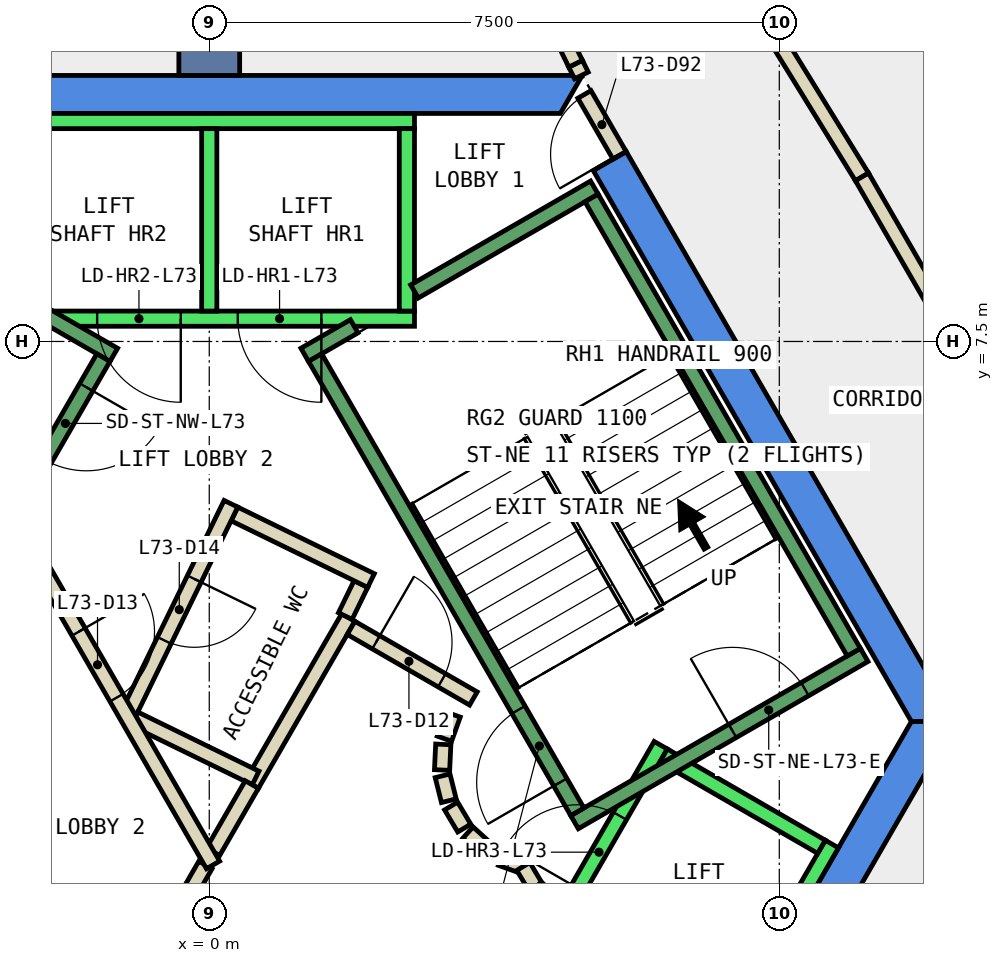
"""IFC4 building model, lengths in metres.
Left out: names, types, materials, properties, quantities, classifications, styles, units other than length and angle.
Written with IfcOpenShell. Run it as: python <this file> out.ifc"""

import sys

from ifc_helpers import new_model, si_unit, direction, frame, frame_2d, origin, place, context, subcontext, project, spatial, polyline, rectangle, outline, extrude, element, fill, save


model = new_model("IFC4")
c1 = context("Model", 3, precision=1e-05, world=origin(), true_north=direction((0.0, 1.0)))
c2 = subcontext(c1, "Body", "Model", "MODEL_VIEW")
j1 = project(units=[si_unit("LENGTHUNIT", "METRE"), si_unit("PLANEANGLEUNIT", "RADIAN")], contexts=[c1])
p1 = place(None, origin())
s1 = spatial("IfcSite", under=j1, at=p1, CompositionType="ELEMENT")
p2 = place(p1, origin())
s2 = spatial("IfcBuilding", under=s1, at=p2, CompositionType="ELEMENT")
p3 = place(p2, frame((0.0, 0.0, 311.6)))
s3 = spatial("IfcBuildingStorey", under=s2, at=p3, CompositionType="ELEMENT", Elevation=311.6)
p4 = place(p3, frame((0.0, 0.0, -0.34)))
e1 = element("IfcWall", 1, at=p4, inside=s3, PredefinedType="SHEAR", context=c2, shape_type="SweptSolid", body=[
    extrude(outline(polyline([(5.486, 9.998), (5.053, 9.748), (9.238, 2.5), (9.815, 2.5), (5.486, 9.998)])), origin(), (0.0, 0.0, 1.0), 3.6),
])
p5 = place(p3, frame((0.0, 0.0, -0.34)))
e2 = element("IfcWall", 2, at=p5, inside=s3, PredefinedType="SHEAR", context=c2, shape_type="SweptSolid", body=[
    extrude(outline(polyline([(4.907, 11.0), (-4.907, 11.0), (-4.619, 10.5), (4.619, 10.5), (4.907, 11.0)])), origin(), (0.0, 0.0, 1.0), 3.6),
])
p6 = place(p3, frame((0.0, 0.0, -0.34)))
e3 = element("IfcWall", 3, at=p6, inside=s3, PredefinedType="SHEAR", context=c2, shape_type="SweptSolid", body=[
    extrude(outline(polyline([(4.907, -6.0), (9.815, 2.5), (9.238, 2.5), (4.619, -5.5), (4.907, -6.0)])), origin(), (0.0, 0.0, 1.0), 3.6),
])
p7 = place(p3, frame((0.0, 11.0, -0.34), z_axis=(0.0, 0.0, 1.0), x_axis=(0.0, 1.0, 0.0)))
e4 = element("IfcWall", 4, at=p7, inside=s3, PredefinedType="SHEAR", context=c2, shape_type="SweptSolid", body=[
    extrude(rectangle(XDim=9.0, YDim=0.8, at=frame_2d((4.5, 0.0))), origin(), (0.0, 0.0, 1.0), 3.6),
])
p8 = place(p3, frame((0.56, 1.671, 0.0), z_axis=(0.0, 0.0, 1.0), x_axis=(0.500008334558, 0.866020591771, 0.0)))
e5 = element("IfcWall", 5, at=p8, inside=s3, PredefinedType="PARTITIONING", context=c2, shape_type="SweptSolid", body=[
    extrude(rectangle(XDim=2.538, YDim=0.2, at=frame_2d((1.269, 0.0))), origin(), (0.0, 0.0, 1.0), 3.26),
])
p9 = place(p3, frame((1.79, 3.888, 0.0), z_axis=(0.0, 0.0, 1.0), x_axis=(0.437807406823, 0.899068781869, 0.0)))
e6 = element("IfcWall", 6, at=p9, inside=s3, PredefinedType="PARTITIONING", context=c2, shape_type="SweptSolid", body=[
    extrude(rectangle(XDim=0.469, YDim=0.2, at=frame_2d((0.234, 0.0))), origin(), (0.0, 0.0, 1.0), 3.26),
])
p10 = place(p3, frame((2.128, 4.355, 0.0), z_axis=(0.0, 0.0, 1.0), x_axis=(-0.898876404494, 0.438202247191, 0.0)))
e7 = element("IfcWall", 7, at=p10, inside=s3, PredefinedType="PARTITIONING", context=c2, shape_type="SweptSolid", body=[
    extrude(rectangle(XDim=1.999, YDim=0.2, at=frame_2d((1.0, 0.0))), origin(), (0.0, 0.0, 1.0), 3.26),
])
p11 = place(p3, frame((0.285, 5.365, 0.0), z_axis=(0.0, 0.0, 1.0), x_axis=(-0.43840190643, -0.898779043168, 0.0)))
e8 = element("IfcWall", 8, at=p11, inside=s3, PredefinedType="PARTITIONING", context=c2, shape_type="SweptSolid", body=[
    extrude(rectangle(XDim=3.1, YDim=0.2, at=frame_2d((1.55, 0.0))), origin(), (0.0, 0.0, 1.0), 3.26),
])
p12 = place(p11, frame((1.1, 0.0, 0.0)))
e9 = element("IfcOpeningElement", 9, at=p12, cuts=e8, PredefinedType="OPENING", context=c2, shape_type="SweptSolid", body=[
    extrude(rectangle(XDim=0.9, YDim=2.1, at=frame_2d((0.45, 1.05))), frame((0.0, 0.11, 0.0), z_axis=(0.0, -1.0, 0.0), x_axis=(1.0, 0.0, 0.0)), (0.0, 0.0, 1.0), 0.22),
])
p13 = place(p3, frame((-0.984, 2.535, 0.0), z_axis=(0.0, 0.0, 1.0), x_axis=(0.898707583217, -0.438548378025, 0.0)))
e10 = element("IfcWall", 10, at=p13, inside=s3, PredefinedType="PARTITIONING", context=c2, shape_type="SweptSolid", body=[
    extrude(rectangle(XDim=1.774, YDim=0.2, at=frame_2d((0.887, 0.0))), origin(), (0.0, 0.0, 1.0), 3.26),
])
p14 = place(p3, frame((4.896, 11.0, 0.0), z_axis=(0.0, 0.0, 1.0), x_axis=(-0.44208884847, 0.896971264901, 0.0)))
e11 = element("IfcWall", 11, at=p14, inside=s3, PredefinedType="PARTITIONING", context=c2, shape_type="SweptSolid", body=[
    extrude(rectangle(XDim=0.172, YDim=0.2, at=frame_2d((0.086, 0.0))), origin(), (0.0, 0.0, 1.0), 2.4),
])
p15 = place(p3, frame((4.454, 16.364, 0.0), z_axis=(0.0, 0.0, 1.0), x_axis=(0.525142215688, -0.851014484778, 0.0)))
e12 = element("IfcWall", 12, at=p15, inside=s3, PredefinedType="PARTITIONING", context=c2, shape_type="SweptSolid", body=[
    extrude(rectangle(XDim=7.872, YDim=0.2, at=frame_2d((3.936, 0.0))), origin(), (0.0, 0.0, 1.0), 3.26),
])
p16 = place(p3, frame((8.588, 9.665, 0.0), z_axis=(0.0, 0.0, 1.0), x_axis=(0.499946799636, -0.86605611685, 0.0)))
e13 = element("IfcWall", 13, at=p16, inside=s3, PredefinedType="PARTITIONING", context=c2, shape_type="SweptSolid", body=[
    extrude(rectangle(XDim=8.227, YDim=0.2, at=frame_2d((4.114, 0.0))), origin(), (0.0, 0.0, 1.0), 3.26),
])
p17 = place(p16, frame((3.613, 0.0, 0.0)))
e14 = element("IfcOpeningElement", 14, at=p17, cuts=e13, PredefinedType="OPENING", context=c2, shape_type="SweptSolid", body=[
    extrude(rectangle(XDim=1.0, YDim=2.1, at=frame_2d((0.5, 1.05))), frame((0.0, 0.11, 0.0), z_axis=(0.0, -1.0, 0.0), x_axis=(1.0, 0.0, 0.0)), (0.0, 0.0, 1.0), 0.22),
])
p18 = place(p3, frame((-0.982, -1.0, 0.0), z_axis=(0.0, 0.0, 1.0), x_axis=(0.50024047865, 0.865886518847, 0.0)))
e15 = element("IfcWall", 15, at=p18, inside=s3, PredefinedType="PARTITIONING", context=c2, shape_type="SweptSolid", body=[
    extrude(rectangle(XDim=1.863, YDim=0.2, at=frame_2d((0.931, 0.0))), origin(), (0.0, 0.0, 1.0), 3.26),
])
p19 = place(p3, frame((0.05, 0.787, 0.0), z_axis=(0.0, 0.0, 1.0), x_axis=(0.499819111317, 0.866129814729, 0.0)))
e16 = element("IfcWall", 16, at=p19, inside=s3, PredefinedType="PARTITIONING", context=c2, shape_type="SweptSolid", body=[
    extrude(rectangle(XDim=1.021, YDim=0.2, at=frame_2d((0.51, 0.0))), origin(), (0.0, 0.0, 1.0), 3.26),
])
p20 = place(p3, frame((1.866, 3.732, 0.0), z_axis=(0.0, 0.0, 1.0), x_axis=(0.866043361281, -0.499968895414, 0.0)))
e17 = element("IfcWall", 17, at=p20, inside=s3, PredefinedType="PARTITIONING", context=c2, shape_type="SweptSolid", body=[
    extrude(rectangle(XDim=1.858, YDim=0.2, at=frame_2d((0.929, 0.0))), origin(), (0.0, 0.0, 1.0), 3.26),
])
p21 = place(p20, frame((0.379, 0.0, 0.0)))
e18 = element("IfcOpeningElement", 18, at=p21, cuts=e17, PredefinedType="OPENING", context=c2, shape_type="SweptSolid", body=[
    extrude(rectangle(XDim=1.0, YDim=2.1, at=frame_2d((0.5, 1.05))), frame((0.0, 0.11, 0.0), z_axis=(0.0, -1.0, 0.0), x_axis=(1.0, 0.0, 0.0)), (0.0, 0.0, 1.0), 0.22),
])
p22 = place(p3, frame((3.208, 2.592, 0.0), z_axis=(0.0, 0.0, 1.0), x_axis=(-0.337388820924, -0.941365382578, 0.0)))
e19 = element("IfcWall", 19, at=p22, inside=s3, PredefinedType="PARTITIONING", context=c2, shape_type="SweptSolid", body=[
    extrude(rectangle(XDim=0.338, YDim=0.2, at=frame_2d((0.169, 0.0))), origin(), (0.0, 0.0, 1.0), 3.26),
])
p23 = place(p3, frame((3.079, 2.199, 0.0), z_axis=(0.0, 0.0, 1.0), x_axis=(-0.047771483479, -0.998858290933, 0.0)))
e20 = element("IfcWall", 20, at=p23, inside=s3, PredefinedType="PARTITIONING", context=c2, shape_type="SweptSolid", body=[
    extrude(rectangle(XDim=0.337, YDim=0.2, at=frame_2d((0.169, 0.0))), origin(), (0.0, 0.0, 1.0), 3.26),
])
p24 = place(p3, frame((3.07, 1.786, 0.0), z_axis=(0.0, 0.0, 1.0), x_axis=(0.242705583207, -0.970099994784, 0.0)))
e21 = element("IfcWall", 21, at=p24, inside=s3, PredefinedType="PARTITIONING", context=c2, shape_type="SweptSolid", body=[
    extrude(rectangle(XDim=0.338, YDim=0.2, at=frame_2d((0.169, 0.0))), origin(), (0.0, 0.0, 1.0), 3.26),
])
for number, where, z_axis, x_axis in (
    (22, (3.182, 1.388, 0.0), (0.0, 0.0, 1.0), (0.512, -0.859, 0.0)),
    (23, (3.404, 1.039, 0.0), (0.0, 0.0, 1.0), (0.74, -0.672, 0.0)),
):
    element("IfcWall", number, at=place(p3, frame(where, z_axis=z_axis, x_axis=x_axis)), inside=s3, PredefinedType="PARTITIONING", context=c2, shape_type="SweptSolid", body=[
        extrude(rectangle(XDim=0.338, YDim=0.2, at=frame_2d((0.169, 0.0))), origin(), (0.0, 0.0, 1.0), 3.26),
    ])
p25 = place(p3, frame((3.838, 0.702, 0.0), z_axis=(0.0, 0.0, 1.0), x_axis=(0.941035081519, -0.338308993895, 0.0)))
e24 = element("IfcWall", 24, at=p25, inside=s3, PredefinedType="PARTITIONING", context=c2, shape_type="SweptSolid", body=[
    extrude(rectangle(XDim=0.337, YDim=0.2, at=frame_2d((0.168, 0.0))), origin(), (0.0, 0.0, 1.0), 3.26),
])
p26 = place(p3, frame((4.132, 0.593, 0.0), z_axis=(0.0, 0.0, 1.0), x_axis=(0.513561617048, -0.858052717201, 0.0)))
e25 = element("IfcWall", 25, at=p26, inside=s3, PredefinedType="PARTITIONING", context=c2, shape_type="SweptSolid", body=[
    extrude(rectangle(XDim=0.308, YDim=0.2, at=frame_2d((0.154, 0.0))), origin(), (0.0, 0.0, 1.0), 3.26),
])
p27 = place(p3, frame((4.301, 0.315, 0.0), z_axis=(0.0, 0.0, 1.0), x_axis=(0.741798017506, -0.670623367639, 0.0)))
e26 = element("IfcWall", 26, at=p27, inside=s3, PredefinedType="PARTITIONING", context=c2, shape_type="SweptSolid", body=[
    extrude(rectangle(XDim=0.309, YDim=0.2, at=frame_2d((0.154, 0.0))), origin(), (0.0, 0.0, 1.0), 3.26),
])
p28 = place(p3, frame((-2.54, 5.1, 0.0), z_axis=(0.0, 0.0, 1.0), x_axis=(0.499925051871, -0.866068670783, 0.0)))
e27 = element("IfcWall", 27, at=p28, inside=s3, PredefinedType="PARTITIONING", context=c2, shape_type="SweptSolid", body=[
    extrude(rectangle(XDim=5.181, YDim=0.2, at=frame_2d((2.59, 0.0))), origin(), (0.0, 0.0, 1.0), 3.26),
])
p29 = place(p28, frame((1.64, 0.0, 0.0)))
e28 = element("IfcOpeningElement", 28, at=p29, cuts=e27, PredefinedType="OPENING", context=c2, shape_type="SweptSolid", body=[
    extrude(rectangle(XDim=1.0, YDim=2.1, at=frame_2d((0.5, 1.05))), frame((0.0, 0.11, 0.0), z_axis=(0.0, -1.0, 0.0), x_axis=(1.0, 0.0, 0.0)), (0.0, 0.0, 1.0), 0.22),
])
p30 = place(p3, frame((5.399, 9.948, 0.0), z_axis=(0.0, 0.0, 1.0), x_axis=(-0.499882215713, 0.866093395895, 0.0)))
e29 = element("IfcWall", 29, at=p30, inside=s3, PredefinedType="PARTITIONING", context=c2, shape_type="SweptSolid", body=[
    extrude(rectangle(XDim=0.926, YDim=0.2, at=frame_2d((0.463, 0.0))), origin(), (0.0, 0.0, 1.0), 2.4),
])
p31 = place(p30, frame((0.017, 0.0, 0.0)))
e30 = element("IfcOpeningElement", 30, at=p31, cuts=e29, PredefinedType="OPENING", context=c2, shape_type="SweptSolid", body=[
    extrude(rectangle(XDim=0.9, YDim=2.1, at=frame_2d((0.45, 1.05))), frame((0.0, 0.11, 0.0), z_axis=(0.0, -1.0, 0.0), x_axis=(1.0, 0.0, 0.0)), (0.0, 0.0, 1.0), 0.22),
])
p32 = place(p3, frame((4.82, 11.154, 0.0), z_axis=(0.0, 0.0, 1.0), x_axis=(-0.439660677009, 0.898163954461, 0.0)))
e31 = element("IfcWall", 31, at=p32, inside=s3, PredefinedType="PARTITIONING", context=c2, shape_type="SweptSolid", body=[
    extrude(rectangle(XDim=0.427, YDim=0.2, at=frame_2d((0.214, 0.0))), origin(), (0.0, 0.0, 1.0), 3.26),
])
p33 = place(p3, frame((2.7, 7.8, 0.0), z_axis=(0.0, 0.0, 1.0), x_axis=(-1.0, 0.0, 0.0)))
e32 = element("IfcWall", 32, at=p33, inside=s3, PredefinedType="STANDARD", context=c2, shape_type="SweptSolid", body=[
    extrude(rectangle(XDim=5.4, YDim=0.2, at=frame_2d((2.7, 0.0))), origin(), (0.0, 0.0, 1.0), 3.26),
])
p34 = place(p33, frame((1.225, 0.0, 0.0)))
e33 = element("IfcOpeningElement", 33, at=p34, cuts=e32, PredefinedType="OPENING", context=c2, shape_type="SweptSolid", body=[
    extrude(rectangle(XDim=1.1, YDim=2.1, at=frame_2d((0.55, 1.05))), frame((0.0, 0.11, 0.0), z_axis=(0.0, -1.0, 0.0), x_axis=(1.0, 0.0, 0.0)), (0.0, 0.0, 1.0), 0.22),
])
p35 = place(p33, frame((3.075, 0.0, 0.0)))
e34 = element("IfcOpeningElement", 34, at=p35, cuts=e32, PredefinedType="OPENING", context=c2, shape_type="SweptSolid", body=[
    extrude(rectangle(XDim=1.1, YDim=2.1, at=frame_2d((0.55, 1.05))), frame((0.0, 0.11, 0.0), z_axis=(0.0, -1.0, 0.0), x_axis=(1.0, 0.0, 0.0)), (0.0, 0.0, 1.0), 0.22),
])
p36 = place(p3, frame((2.7, 10.4, 0.0), z_axis=(0.0, 0.0, 1.0), x_axis=(-1.0, 0.0, 0.0)))
e35 = element("IfcWall", 35, at=p36, inside=s3, PredefinedType="STANDARD", context=c2, shape_type="SweptSolid", body=[
    extrude(rectangle(XDim=5.4, YDim=0.2, at=frame_2d((2.7, 0.0))), origin(), (0.0, 0.0, 1.0), 3.26),
])
for number, where, z_axis, x_axis in (
    (36, (2.6, 7.9, 0.0), (0.0, 0.0, 1.0), (0.0, 1.0, 0.0)),
    (37, (0.0, 7.9, 0.0), (0.0, 0.0, 1.0), (0.0, 1.0, 0.0)),
):
    element("IfcWall", number, at=place(p3, frame(where, z_axis=z_axis, x_axis=x_axis)), inside=s3, PredefinedType="STANDARD", context=c2, shape_type="SweptSolid", body=[
        extrude(rectangle(XDim=2.4, YDim=0.2, at=frame_2d((1.2, 0.0))), origin(), (0.0, 0.0, 1.0), 3.26),
    ])
p37 = place(p3, frame((3.24, -2.488, 0.0), z_axis=(0.0, 0.0, 1.0), x_axis=(0.500034260056, 0.866005622828, 0.0)))
e38 = element("IfcWall", 38, at=p37, inside=s3, PredefinedType="STANDARD", context=c2, shape_type="SweptSolid", body=[
    extrude(rectangle(XDim=5.399, YDim=0.2, at=frame_2d((2.7, 0.0))), origin(), (0.0, 0.0, 1.0), 3.26),
])
p38 = place(p37, frame((3.225, 0.0, 0.0)))
e39 = element("IfcOpeningElement", 39, at=p38, cuts=e38, PredefinedType="OPENING", context=c2, shape_type="SweptSolid", body=[
    extrude(rectangle(XDim=1.1, YDim=2.1, at=frame_2d((0.55, 1.05))), frame((0.0, 0.11, 0.0), z_axis=(0.0, -1.0, 0.0), x_axis=(1.0, 0.0, 0.0)), (0.0, 0.0, 1.0), 0.22),
])
p39 = place(p37, frame((1.225, 0.0, 0.0)))
e40 = element("IfcOpeningElement", 40, at=p39, cuts=e38, PredefinedType="OPENING", context=c2, shape_type="SweptSolid", body=[
    extrude(rectangle(XDim=1.1, YDim=2.1, at=frame_2d((0.55, 1.05))), frame((0.0, 0.11, 0.0), z_axis=(0.0, -1.0, 0.0), x_axis=(1.0, 0.0, 0.0)), (0.0, 0.0, 1.0), 0.22),
])
p40 = place(p3, frame((5.492, -3.788, 0.0), z_axis=(0.0, 0.0, 1.0), x_axis=(0.500034260056, 0.866005622828, 0.0)))
e41 = element("IfcWall", 41, at=p40, inside=s3, PredefinedType="STANDARD", context=c2, shape_type="SweptSolid", body=[
    extrude(rectangle(XDim=5.399, YDim=0.2, at=frame_2d((2.7, 0.0))), origin(), (0.0, 0.0, 1.0), 3.26),
])
p41 = place(p3, frame((5.977, 2.052, 0.0), z_axis=(0.0, 0.0, 1.0), x_axis=(0.865973769406, -0.500089422704, 0.0)))
e42 = element("IfcWall", 42, at=p41, inside=s3, PredefinedType="STANDARD", context=c2, shape_type="SweptSolid", body=[
    extrude(rectangle(XDim=2.399, YDim=0.2, at=frame_2d((1.2, 0.0))), origin(), (0.0, 0.0, 1.0), 3.26),
])
p42 = place(p3, frame((4.806, 1.176, 0.0), z_axis=(0.0, 0.0, 1.0), x_axis=(0.866059941101, 0.499940174841, 0.0)))
e43 = element("IfcWall", 43, at=p42, inside=s3, PredefinedType="STANDARD", context=c2, shape_type="SweptSolid", body=[
    extrude(rectangle(XDim=4.4, YDim=0.2, at=frame_2d((2.2, 0.0))), origin(), (0.0, 0.0, 1.0), 3.26),
])
p43 = place(p42, frame((2.4, 0.0, 0.0)))
e44 = element("IfcOpeningElement", 44, at=p43, cuts=e43, PredefinedType="OPENING", context=c2, shape_type="SweptSolid", body=[
    extrude(rectangle(XDim=1.1, YDim=2.2, at=frame_2d((0.55, 1.1))), frame((0.0, 0.11, 0.0), z_axis=(0.0, -1.0, 0.0), x_axis=(1.0, 0.0, 0.0)), (0.0, 0.0, 1.0), 0.22),
])
p44 = place(p3, frame((2.7, 8.158, 0.0), z_axis=(0.0, 0.0, 1.0), x_axis=(0.86611865017, 0.499838457731, 0.0)))
e45 = element("IfcWall", 45, at=p44, inside=s3, PredefinedType="STANDARD", context=c2, shape_type="SweptSolid", body=[
    extrude(rectangle(XDim=2.733, YDim=0.2, at=frame_2d((1.366, 0.0))), origin(), (0.0, 0.0, 1.0), 3.26),
])
p45 = place(p3, frame((1.256, 7.324, 0.0), z_axis=(0.0, 0.0, 1.0), x_axis=(0.865915093549, 0.500191014278, 0.0)))
e46 = element("IfcWall", 46, at=p45, inside=s3, PredefinedType="STANDARD", context=c2, shape_type="SweptSolid", body=[
    extrude(rectangle(XDim=0.752, YDim=0.2, at=frame_2d((0.376, 0.0))), origin(), (0.0, 0.0, 1.0), 3.26),
])
p46 = place(p3, frame((4.843, 1.312, 0.0), z_axis=(0.0, 0.0, 1.0), x_axis=(-0.499963383562, 0.866046543262, 0.0)))
e47 = element("IfcWall", 47, at=p46, inside=s3, PredefinedType="STANDARD", context=c2, shape_type="SweptSolid", body=[
    extrude(rectangle(XDim=6.9, YDim=0.2, at=frame_2d((3.45, 0.0))), origin(), (0.0, 0.0, 1.0), 3.26),
])
p47 = place(p46, frame((0.45, 0.0, 0.0)))
e48 = element("IfcOpeningElement", 48, at=p47, cuts=e47, PredefinedType="OPENING", context=c2, shape_type="SweptSolid", body=[
    extrude(rectangle(XDim=1.1, YDim=2.2, at=frame_2d((0.55, 1.1))), frame((0.0, 0.11, 0.0), z_axis=(0.0, -1.0, 0.0), x_axis=(1.0, 0.0, 0.0)), (0.0, 0.0, 1.0), 0.22),
])
p48 = place(p3, frame((8.48, 3.412, 0.0), z_axis=(0.0, 0.0, 1.0), x_axis=(-0.499978703459, 0.866037698999, 0.0)))
e49 = element("IfcWall", 49, at=p48, inside=s3, PredefinedType="STANDARD", context=c2, shape_type="SweptSolid", body=[
    extrude(rectangle(XDim=6.9, YDim=0.2, at=frame_2d((3.45, 0.0))), origin(), (0.0, 0.0, 1.0), 3.26),
])
p49 = place(p3, frame((-1.256, 7.324, 0.0), z_axis=(0.0, 0.0, 1.0), x_axis=(-0.866046073146, 0.499964197906, 0.0)))
e50 = element("IfcWall", 50, at=p49, inside=s3, PredefinedType="STANDARD", context=c2, shape_type="SweptSolid", body=[
    extrude(rectangle(XDim=4.4, YDim=0.2, at=frame_2d((2.2, 0.0))), origin(), (0.0, 0.0, 1.0), 3.26),
])
p50 = place(p49, frame((2.4, 0.0, 0.0)))
e51 = element("IfcOpeningElement", 51, at=p50, cuts=e50, PredefinedType="OPENING", context=c2, shape_type="SweptSolid", body=[
    extrude(rectangle(XDim=1.1, YDim=2.2, at=frame_2d((0.55, 1.1))), frame((0.0, 0.11, 0.0), z_axis=(0.0, -1.0, 0.0), x_axis=(1.0, 0.0, 0.0)), (0.0, 0.0, 1.0), 0.22),
])
p51 = place(p3, frame((-1.393, 7.288, 0.0), z_axis=(0.0, 0.0, 1.0), x_axis=(-0.499963383562, -0.866046543262, 0.0)))
e52 = element("IfcWall", 52, at=p51, inside=s3, PredefinedType="STANDARD", context=c2, shape_type="SweptSolid", body=[
    extrude(rectangle(XDim=6.9, YDim=0.2, at=frame_2d((3.45, 0.0))), origin(), (0.0, 0.0, 1.0), 3.26),
])
p52 = place(p51, frame((0.45, 0.0, 0.0)))
e53 = element("IfcOpeningElement", 53, at=p52, cuts=e52, PredefinedType="OPENING", context=c2, shape_type="SweptSolid", body=[
    extrude(rectangle(XDim=1.1, YDim=2.2, at=frame_2d((0.55, 1.1))), frame((0.0, 0.11, 0.0), z_axis=(0.0, -1.0, 0.0), x_axis=(1.0, 0.0, 0.0)), (0.0, 0.0, 1.0), 0.22),
])
p53 = place(p21, origin())
e54 = element("IfcDoor", 54, at=p53, inside=s3, OperationType="SINGLE_SWING_LEFT", PredefinedType="DOOR", context=c2, shape_type="SweptSolid", body=[
    extrude(rectangle(XDim=1.0, YDim=2.1, at=frame_2d((0.5, 1.05))), frame((0.0, 0.025, 0.0), z_axis=(0.0, -1.0, 0.0), x_axis=(1.0, 0.0, 0.0)), (0.0, 0.0, 1.0), 0.05),
])
fill(e18, e54)
p54 = place(p29, origin())
e55 = element("IfcDoor", 55, at=p54, inside=s3, OperationType="SINGLE_SWING_RIGHT", PredefinedType="DOOR", context=c2, shape_type="SweptSolid", body=[
    extrude(rectangle(XDim=1.0, YDim=2.1, at=frame_2d((0.5, 1.05))), frame((0.0, 0.025, 0.0), z_axis=(0.0, -1.0, 0.0), x_axis=(1.0, 0.0, 0.0)), (0.0, 0.0, 1.0), 0.05),
])
fill(e28, e55)
p55 = place(p12, origin())
e56 = element("IfcDoor", 56, at=p55, inside=s3, OperationType="SINGLE_SWING_RIGHT", PredefinedType="DOOR", context=c2, shape_type="SweptSolid", body=[
    extrude(rectangle(XDim=0.9, YDim=2.1, at=frame_2d((0.45, 1.05))), frame((0.0, 0.025, 0.0), z_axis=(0.0, -1.0, 0.0), x_axis=(1.0, 0.0, 0.0)), (0.0, 0.0, 1.0), 0.05),
])
fill(e9, e56)
p56 = place(p31, origin())
e57 = element("IfcDoor", 57, at=p56, inside=s3, OperationType="SINGLE_SWING_LEFT", PredefinedType="DOOR", context=c2, shape_type="SweptSolid", body=[
    extrude(rectangle(XDim=0.9, YDim=2.1, at=frame_2d((0.45, 1.05))), frame((0.0, 0.025, 0.0), z_axis=(0.0, -1.0, 0.0), x_axis=(1.0, 0.0, 0.0)), (0.0, 0.0, 1.0), 0.05),
])
fill(e30, e57)
p57 = place(p34, origin())
e58 = element("IfcDoor", 58, at=p57, inside=s3, OperationType="SLIDING_TO_LEFT", PredefinedType="DOOR", context=c2, shape_type="SweptSolid", body=[
    extrude(rectangle(XDim=1.1, YDim=2.1, at=frame_2d((0.55, 1.05))), frame((0.0, 0.025, 0.0), z_axis=(0.0, -1.0, 0.0), x_axis=(1.0, 0.0, 0.0)), (0.0, 0.0, 1.0), 0.05),
])
fill(e33, e58)
p58 = place(p35, origin())
e59 = element("IfcDoor", 59, at=p58, inside=s3, OperationType="SLIDING_TO_LEFT", PredefinedType="DOOR", context=c2, shape_type="SweptSolid", body=[
    extrude(rectangle(XDim=1.1, YDim=2.1, at=frame_2d((0.55, 1.05))), frame((0.0, 0.025, 0.0), z_axis=(0.0, -1.0, 0.0), x_axis=(1.0, 0.0, 0.0)), (0.0, 0.0, 1.0), 0.05),
])
fill(e34, e59)
p59 = place(p38, origin())
e60 = element("IfcDoor", 60, at=p59, inside=s3, OperationType="SLIDING_TO_LEFT", PredefinedType="DOOR", context=c2, shape_type="SweptSolid", body=[
    extrude(rectangle(XDim=1.1, YDim=2.1, at=frame_2d((0.55, 1.05))), frame((0.0, 0.025, 0.0), z_axis=(0.0, -1.0, 0.0), x_axis=(1.0, 0.0, 0.0)), (0.0, 0.0, 1.0), 0.05),
])
fill(e39, e60)
p60 = place(p47, origin())
e61 = element("IfcDoor", 61, at=p60, inside=s3, OperationType="SINGLE_SWING_LEFT", PredefinedType="DOOR", context=c2, shape_type="SweptSolid", body=[
    extrude(rectangle(XDim=1.1, YDim=2.2, at=frame_2d((0.55, 1.1))), frame((0.0, 0.025, 0.0), z_axis=(0.0, -1.0, 0.0), x_axis=(1.0, 0.0, 0.0)), (0.0, 0.0, 1.0), 0.05),
])
fill(e48, e61)
p61 = place(p43, origin())
e62 = element("IfcDoor", 62, at=p61, inside=s3, OperationType="SINGLE_SWING_LEFT", PredefinedType="DOOR", context=c2, shape_type="SweptSolid", body=[
    extrude(rectangle(XDim=1.1, YDim=2.2, at=frame_2d((0.55, 1.1))), frame((0.0, 0.025, 0.0), z_axis=(0.0, -1.0, 0.0), x_axis=(1.0, 0.0, 0.0)), (0.0, 0.0, 1.0), 0.05),
])
fill(e44, e62)
p62 = place(p52, origin())
e63 = element("IfcDoor", 63, at=p62, inside=s3, OperationType="SINGLE_SWING_LEFT", PredefinedType="DOOR", context=c2, shape_type="SweptSolid", body=[
    extrude(rectangle(XDim=1.1, YDim=2.2, at=frame_2d((0.55, 1.1))), frame((0.0, 0.025, 0.0), z_axis=(0.0, -1.0, 0.0), x_axis=(1.0, 0.0, 0.0)), (0.0, 0.0, 1.0), 0.05),
])
fill(e53, e63)
save(model, sys.argv[1])
